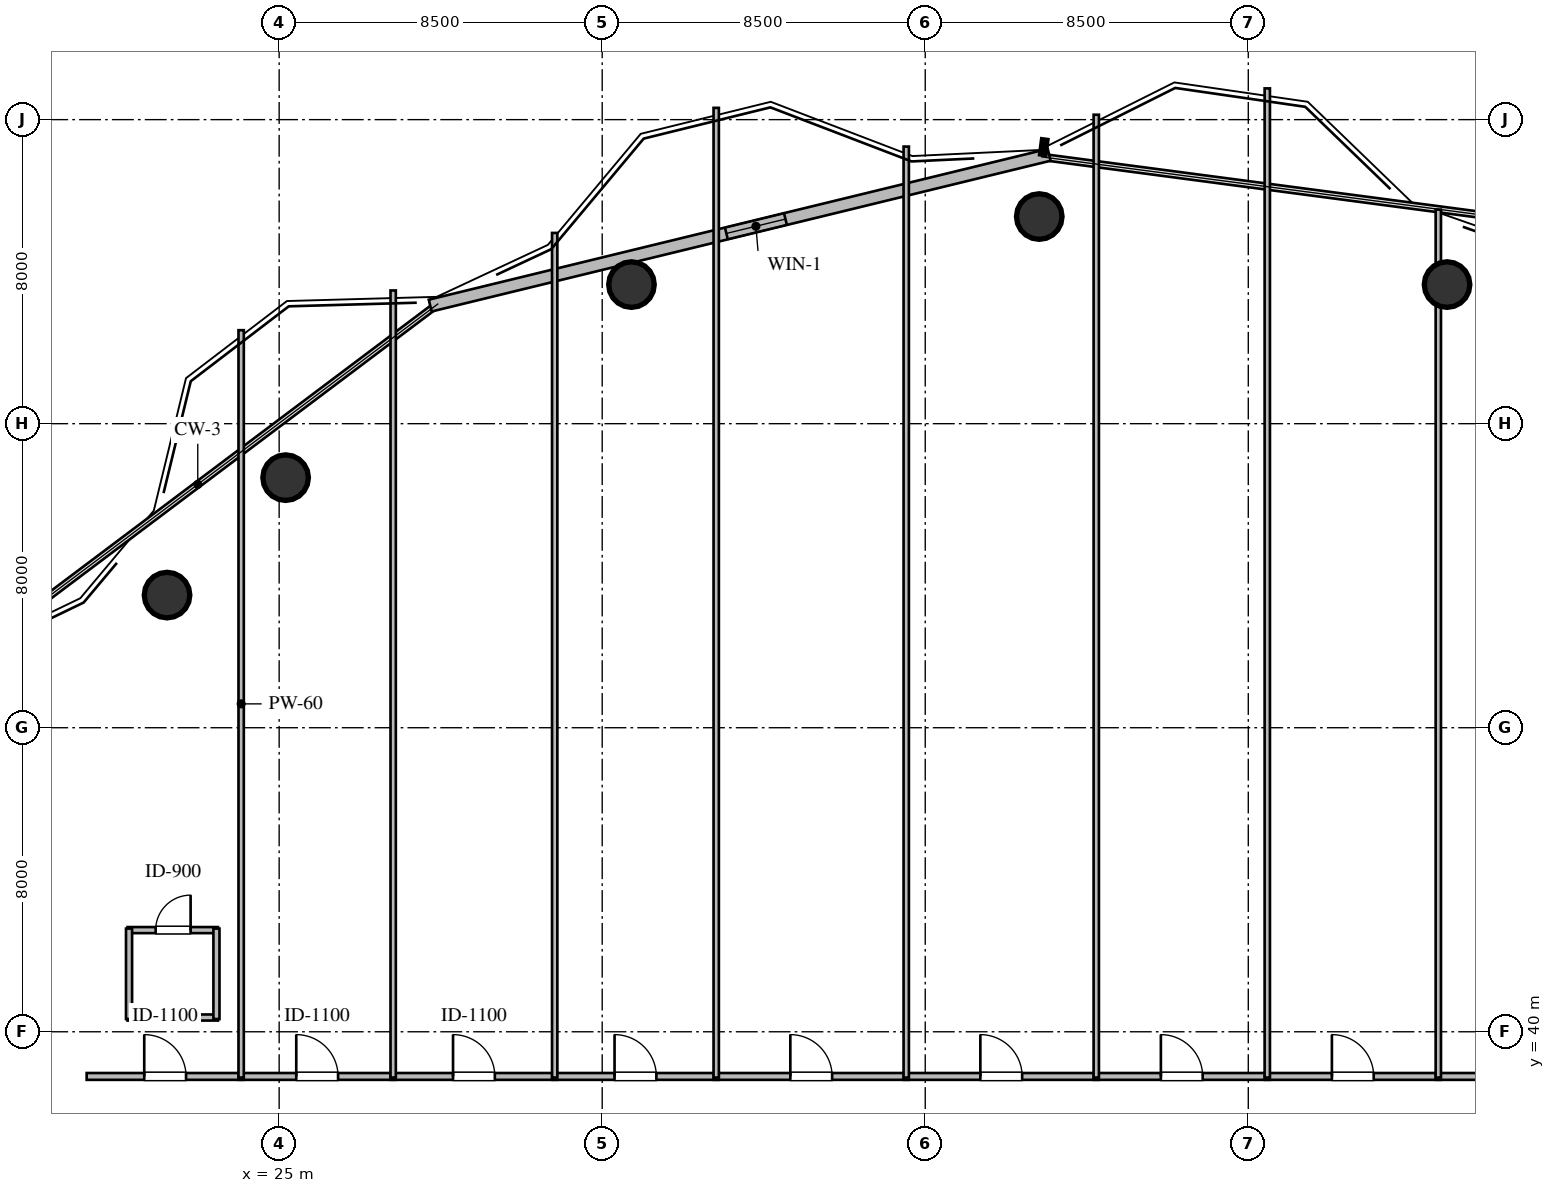
"""IFC4 building model, lengths in metres.
Left out: names, types, materials, properties, quantities, classifications, styles, units other than length and angle.
Written with IfcOpenShell. Run it as: python <this file> out.ifc"""

import sys

from ifc_helpers import new_model, si_unit, direction, frame, frame_2d, origin, origin_2d, place, context, subcontext, project, spatial, rectangle, circle, extrude, element, fill, save


model = new_model("IFC4")
c1 = context("Model", 3, precision=1e-05, world=origin(), true_north=direction((0.0, 1.0)))
c2 = subcontext(c1, "Body", "Model", "MODEL_VIEW")
j1 = project(units=[si_unit("LENGTHUNIT", "METRE"), si_unit("PLANEANGLEUNIT", "RADIAN")], contexts=[c1])
p1 = place(None, origin())
s1 = spatial("IfcSite", under=j1, at=p1, CompositionType="ELEMENT")
p2 = place(p1, origin())
s2 = spatial("IfcBuilding", under=s1, at=p2, CompositionType="ELEMENT")
p3 = place(p2, frame((0.0, 0.0, 113.4)))
s3 = spatial("IfcBuildingStorey", under=s2, at=p3, CompositionType="ELEMENT", Elevation=113.4)
for number, where, z_axis, x_axis in (
    (1, (55.73, 59.66, 0.0), (0.0, 0.0, 1.0), (1.0, 0.0, 0.0)),
    (2, (45.0, 61.45, 0.0), (0.0, 0.0, 1.0), (1.0, 0.0, 0.0)),
    (3, (34.27, 59.66, 0.0), (0.0, 0.0, 1.0), (1.0, 0.0, 0.0)),
    (4, (25.17, 54.58, 0.0), (0.0, 0.0, 1.0), (1.0, 0.0, 0.0)),
    (5, (22.05, 51.49, 0.0), (0.0, 0.0, 1.0), (1.0, 0.0, 0.0)),
):
    element("IfcColumn", number, at=place(p3, frame(where, z_axis=z_axis, x_axis=x_axis)), inside=s3, PredefinedType="COLUMN", context=c2, shape_type="SweptSolid", body=[
        extrude(circle(Radius=0.6, at=origin_2d()), origin(), (0.0, 0.0, 1.0), 3.6),
    ])
p4 = place(p3, frame((28.974, 59.107, 0.0), z_axis=(0.0, 0.0, 1.0), x_axis=(0.971593971582, 0.236654081699, 0.0)))
e6 = element("IfcWall", 6, at=p4, inside=s3, PredefinedType="STANDARD", context=c2, shape_type="SweptSolid", body=[
    extrude(rectangle(XDim=16.763, YDim=0.32, at=frame_2d((8.381, 0.0))), origin(), (0.0, 0.0, 1.0), 3.36),
])
p5 = place(p4, frame((8.021, 0.0, 1.05)))
e7 = element("IfcOpeningElement", 7, at=p5, cuts=e6, PredefinedType="OPENING", context=c2, shape_type="SweptSolid", body=[
    extrude(rectangle(XDim=1.6, YDim=1.5, at=frame_2d((0.8, 0.75))), frame((0.0, 0.17, 0.0), z_axis=(0.0, -1.0, 0.0), x_axis=(1.0, 0.0, 0.0)), (0.0, 0.0, 1.0), 0.34),
])
p6 = place(p3, frame((21.01, 40.375, 0.0), z_axis=(0.0, 0.0, 1.0), x_axis=(1.0, 0.0, 0.0)))
e8 = element("IfcWall", 8, at=p6, inside=s3, PredefinedType="PLUMBINGWALL", context=c2, shape_type="SweptSolid", body=[
    extrude(rectangle(XDim=2.38, YDim=0.16, at=frame_2d((1.19, 0.0))), origin(), (0.0, 0.0, 1.0), 3.36),
])
p7 = place(p3, frame((21.01, 42.675, 0.0), z_axis=(0.0, 0.0, 1.0), x_axis=(1.0, 0.0, 0.0)))
e9 = element("IfcWall", 9, at=p7, inside=s3, PredefinedType="PLUMBINGWALL", context=c2, shape_type="SweptSolid", body=[
    extrude(rectangle(XDim=2.38, YDim=0.16, at=frame_2d((1.19, 0.0))), origin(), (0.0, 0.0, 1.0), 3.36),
])
p8 = place(p7, frame((0.74, 0.0, 0.0)))
e10 = element("IfcOpeningElement", 10, at=p8, cuts=e9, PredefinedType="OPENING", context=c2, shape_type="SweptSolid", body=[
    extrude(rectangle(XDim=0.92, YDim=2.1, at=frame_2d((0.46, 1.05))), frame((0.0, 0.09, 0.0), z_axis=(0.0, -1.0, 0.0), x_axis=(1.0, 0.0, 0.0)), (0.0, 0.0, 1.0), 0.18),
])
p9 = place(p3, frame((21.05, 40.335, 0.0), z_axis=(0.0, 0.0, 1.0), x_axis=(0.0, 1.0, 0.0)))
e11 = element("IfcWall", 11, at=p9, inside=s3, PredefinedType="PLUMBINGWALL", context=c2, shape_type="SweptSolid", body=[
    extrude(rectangle(XDim=2.38, YDim=0.16, at=frame_2d((1.19, 0.0))), origin(), (0.0, 0.0, 1.0), 3.36),
])
p10 = place(p3, frame((23.35, 40.335, 0.0), z_axis=(0.0, 0.0, 1.0), x_axis=(0.0, 1.0, 0.0)))
e12 = element("IfcWall", 12, at=p10, inside=s3, PredefinedType="PLUMBINGWALL", context=c2, shape_type="SweptSolid", body=[
    extrude(rectangle(XDim=2.38, YDim=0.16, at=frame_2d((1.19, 0.0))), origin(), (0.0, 0.0, 1.0), 2.89),
])
p11 = place(p3, frame((19.935, 38.825, 0.0), z_axis=(0.0, 0.0, 1.0), x_axis=(1.0, 0.0, 0.0)))
e13 = element("IfcWall", 13, at=p11, inside=s3, PredefinedType="PARTITIONING", context=c2, shape_type="SweptSolid", body=[
    extrude(rectangle(XDim=4.13, YDim=0.18, at=frame_2d((2.065, 0.0))), origin(), (0.0, 0.0, 1.0), 3.36),
])
p12 = place(p11, frame((1.515, 0.0, 0.0)))
e14 = element("IfcOpeningElement", 14, at=p12, cuts=e13, PredefinedType="OPENING", context=c2, shape_type="SweptSolid", body=[
    extrude(rectangle(XDim=1.1, YDim=2.1, at=frame_2d((0.55, 1.05))), frame((0.0, 0.1, 0.0), z_axis=(0.0, -1.0, 0.0), x_axis=(1.0, 0.0, 0.0)), (0.0, 0.0, 1.0), 0.2),
])
p13 = place(p3, frame((23.935, 38.825, 0.0), z_axis=(0.0, 0.0, 1.0), x_axis=(1.0, 0.0, 0.0)))
e15 = element("IfcWall", 15, at=p13, inside=s3, PredefinedType="PARTITIONING", context=c2, shape_type="SweptSolid", body=[
    extrude(rectangle(XDim=4.13, YDim=0.18, at=frame_2d((2.065, 0.0))), origin(), (0.0, 0.0, 1.0), 3.36),
])
p14 = place(p13, frame((1.515, 0.0, 0.0)))
e16 = element("IfcOpeningElement", 16, at=p14, cuts=e15, PredefinedType="OPENING", context=c2, shape_type="SweptSolid", body=[
    extrude(rectangle(XDim=1.1, YDim=2.1, at=frame_2d((0.55, 1.05))), frame((0.0, 0.1, 0.0), z_axis=(0.0, -1.0, 0.0), x_axis=(1.0, 0.0, 0.0)), (0.0, 0.0, 1.0), 0.2),
])
p15 = place(p3, frame((27.935, 38.825, 0.0), z_axis=(0.0, 0.0, 1.0), x_axis=(1.0, 0.0, 0.0)))
e17 = element("IfcWall", 17, at=p15, inside=s3, PredefinedType="PARTITIONING", context=c2, shape_type="SweptSolid", body=[
    extrude(rectangle(XDim=4.38, YDim=0.18, at=frame_2d((2.19, 0.0))), origin(), (0.0, 0.0, 1.0), 3.36),
])
p16 = place(p15, frame((1.64, 0.0, 0.0)))
e18 = element("IfcOpeningElement", 18, at=p16, cuts=e17, PredefinedType="OPENING", context=c2, shape_type="SweptSolid", body=[
    extrude(rectangle(XDim=1.1, YDim=2.1, at=frame_2d((0.55, 1.05))), frame((0.0, 0.1, 0.0), z_axis=(0.0, -1.0, 0.0), x_axis=(1.0, 0.0, 0.0)), (0.0, 0.0, 1.0), 0.2),
])
p17 = place(p3, frame((32.185, 38.825, 0.0), z_axis=(0.0, 0.0, 1.0), x_axis=(1.0, 0.0, 0.0)))
e19 = element("IfcWall", 19, at=p17, inside=s3, PredefinedType="PARTITIONING", context=c2, shape_type="SweptSolid", body=[
    extrude(rectangle(XDim=4.38, YDim=0.18, at=frame_2d((2.19, 0.0))), origin(), (0.0, 0.0, 1.0), 3.36),
])
p18 = place(p17, frame((1.64, 0.0, 0.0)))
e20 = element("IfcOpeningElement", 20, at=p18, cuts=e19, PredefinedType="OPENING", context=c2, shape_type="SweptSolid", body=[
    extrude(rectangle(XDim=1.1, YDim=2.1, at=frame_2d((0.55, 1.05))), frame((0.0, 0.1, 0.0), z_axis=(0.0, -1.0, 0.0), x_axis=(1.0, 0.0, 0.0)), (0.0, 0.0, 1.0), 0.2),
])
p19 = place(p3, frame((36.435, 38.825, 0.0), z_axis=(0.0, 0.0, 1.0), x_axis=(1.0, 0.0, 0.0)))
e21 = element("IfcWall", 21, at=p19, inside=s3, PredefinedType="PARTITIONING", context=c2, shape_type="SweptSolid", body=[
    extrude(rectangle(XDim=5.13, YDim=0.18, at=frame_2d((2.565, 0.0))), origin(), (0.0, 0.0, 1.0), 3.36),
])
p20 = place(p19, frame((2.015, 0.0, 0.0)))
e22 = element("IfcOpeningElement", 22, at=p20, cuts=e21, PredefinedType="OPENING", context=c2, shape_type="SweptSolid", body=[
    extrude(rectangle(XDim=1.1, YDim=2.1, at=frame_2d((0.55, 1.05))), frame((0.0, 0.1, 0.0), z_axis=(0.0, -1.0, 0.0), x_axis=(1.0, 0.0, 0.0)), (0.0, 0.0, 1.0), 0.2),
])
p21 = place(p3, frame((41.435, 38.825, 0.0), z_axis=(0.0, 0.0, 1.0), x_axis=(1.0, 0.0, 0.0)))
e23 = element("IfcWall", 23, at=p21, inside=s3, PredefinedType="PARTITIONING", context=c2, shape_type="SweptSolid", body=[
    extrude(rectangle(XDim=5.13, YDim=0.18, at=frame_2d((2.565, 0.0))), origin(), (0.0, 0.0, 1.0), 3.36),
])
p22 = place(p21, frame((2.015, 0.0, 0.0)))
e24 = element("IfcOpeningElement", 24, at=p22, cuts=e23, PredefinedType="OPENING", context=c2, shape_type="SweptSolid", body=[
    extrude(rectangle(XDim=1.1, YDim=2.1, at=frame_2d((0.55, 1.05))), frame((0.0, 0.1, 0.0), z_axis=(0.0, -1.0, 0.0), x_axis=(1.0, 0.0, 0.0)), (0.0, 0.0, 1.0), 0.2),
])
p23 = place(p3, frame((46.435, 38.825, 0.0), z_axis=(0.0, 0.0, 1.0), x_axis=(1.0, 0.0, 0.0)))
e25 = element("IfcWall", 25, at=p23, inside=s3, PredefinedType="PARTITIONING", context=c2, shape_type="SweptSolid", body=[
    extrude(rectangle(XDim=4.63, YDim=0.18, at=frame_2d((2.315, 0.0))), origin(), (0.0, 0.0, 1.0), 3.36),
])
p24 = place(p23, frame((1.765, 0.0, 0.0)))
e26 = element("IfcOpeningElement", 26, at=p24, cuts=e25, PredefinedType="OPENING", context=c2, shape_type="SweptSolid", body=[
    extrude(rectangle(XDim=1.1, YDim=2.1, at=frame_2d((0.55, 1.05))), frame((0.0, 0.1, 0.0), z_axis=(0.0, -1.0, 0.0), x_axis=(1.0, 0.0, 0.0)), (0.0, 0.0, 1.0), 0.2),
])
p25 = place(p3, frame((50.935, 38.825, 0.0), z_axis=(0.0, 0.0, 1.0), x_axis=(1.0, 0.0, 0.0)))
e27 = element("IfcWall", 27, at=p25, inside=s3, PredefinedType="PARTITIONING", context=c2, shape_type="SweptSolid", body=[
    extrude(rectangle(XDim=4.63, YDim=0.18, at=frame_2d((2.315, 0.0))), origin(), (0.0, 0.0, 1.0), 3.36),
])
p26 = place(p25, frame((1.765, 0.0, 0.0)))
e28 = element("IfcOpeningElement", 28, at=p26, cuts=e27, PredefinedType="OPENING", context=c2, shape_type="SweptSolid", body=[
    extrude(rectangle(XDim=1.1, YDim=2.1, at=frame_2d((0.55, 1.05))), frame((0.0, 0.1, 0.0), z_axis=(0.0, -1.0, 0.0), x_axis=(1.0, 0.0, 0.0)), (0.0, 0.0, 1.0), 0.2),
])
p27 = place(p3, frame((55.435, 38.825, 0.0), z_axis=(0.0, 0.0, 1.0), x_axis=(1.0, 0.0, 0.0)))
e29 = element("IfcWall", 29, at=p27, inside=s3, PredefinedType="PARTITIONING", context=c2, shape_type="SweptSolid", body=[
    extrude(rectangle(XDim=9.66, YDim=0.18, at=frame_2d((4.83, 0.0))), origin(), (0.0, 0.0, 1.0), 3.36),
])
p28 = place(p27, frame((4.28, 0.0, 0.0)))
e30 = element("IfcOpeningElement", 30, at=p28, cuts=e29, PredefinedType="OPENING", context=c2, shape_type="SweptSolid", body=[
    extrude(rectangle(XDim=1.1, YDim=2.1, at=frame_2d((0.55, 1.05))), frame((0.0, 0.1, 0.0), z_axis=(0.0, -1.0, 0.0), x_axis=(1.0, 0.0, 0.0)), (0.0, 0.0, 1.0), 0.2),
])
p29 = place(p3, frame((24.0, 58.46, 0.0), z_axis=(0.0, 0.0, 1.0), x_axis=(0.0, -1.0, 0.0)))
e31 = element("IfcWall", 31, at=p29, inside=s3, PredefinedType="PARTITIONING", context=c2, shape_type="SweptSolid", body=[
    extrude(rectangle(XDim=19.665, YDim=0.14, at=frame_2d((9.833, 0.0))), origin(), (0.0, 0.0, 1.0), 2.89),
])
p30 = place(p3, frame((28.0, 59.505, 0.0), z_axis=(0.0, 0.0, 1.0), x_axis=(0.0, -1.0, 0.0)))
e32 = element("IfcWall", 32, at=p30, inside=s3, PredefinedType="PARTITIONING", context=c2, shape_type="SweptSolid", body=[
    extrude(rectangle(XDim=20.71, YDim=0.14, at=frame_2d((10.355, 0.0))), origin(), (0.0, 0.0, 1.0), 3.36),
])
p31 = place(p3, frame((32.25, 61.019, 0.0), z_axis=(0.0, 0.0, 1.0), x_axis=(0.0, -1.0, 0.0)))
e33 = element("IfcWall", 33, at=p31, inside=s3, PredefinedType="PARTITIONING", context=c2, shape_type="SweptSolid", body=[
    extrude(rectangle(XDim=22.224, YDim=0.14, at=frame_2d((11.112, 0.0))), origin(), (0.0, 0.0, 1.0), 3.36),
])
p32 = place(p3, frame((36.5, 64.31, 0.0), z_axis=(0.0, 0.0, 1.0), x_axis=(0.0, -1.0, 0.0)))
e34 = element("IfcWall", 34, at=p32, inside=s3, PredefinedType="PARTITIONING", context=c2, shape_type="SweptSolid", body=[
    extrude(rectangle(XDim=25.515, YDim=0.14, at=frame_2d((12.758, 0.0))), origin(), (0.0, 0.0, 1.0), 3.36),
])
p33 = place(p3, frame((41.5, 63.291, 0.0), z_axis=(0.0, 0.0, 1.0), x_axis=(0.0, -1.0, 0.0)))
e35 = element("IfcWall", 35, at=p33, inside=s3, PredefinedType="PARTITIONING", context=c2, shape_type="SweptSolid", body=[
    extrude(rectangle(XDim=24.496, YDim=0.14, at=frame_2d((12.248, 0.0))), origin(), (0.0, 0.0, 1.0), 3.36),
])
p34 = place(p3, frame((46.5, 64.129, 0.0), z_axis=(0.0, 0.0, 1.0), x_axis=(0.0, -1.0, 0.0)))
e36 = element("IfcWall", 36, at=p34, inside=s3, PredefinedType="PARTITIONING", context=c2, shape_type="SweptSolid", body=[
    extrude(rectangle(XDim=25.334, YDim=0.14, at=frame_2d((12.667, 0.0))), origin(), (0.0, 0.0, 1.0), 3.36),
])
p35 = place(p3, frame((51.0, 64.822, 0.0), z_axis=(0.0, 0.0, 1.0), x_axis=(0.0, -1.0, 0.0)))
e37 = element("IfcWall", 37, at=p35, inside=s3, PredefinedType="PARTITIONING", context=c2, shape_type="SweptSolid", body=[
    extrude(rectangle(XDim=26.027, YDim=0.14, at=frame_2d((13.014, 0.0))), origin(), (0.0, 0.0, 1.0), 3.36),
])
p36 = place(p3, frame((55.5, 61.633, 0.0), z_axis=(0.0, 0.0, 1.0), x_axis=(0.0, -1.0, 0.0)))
e38 = element("IfcWall", 38, at=p36, inside=s3, PredefinedType="PARTITIONING", context=c2, shape_type="SweptSolid", body=[
    extrude(rectangle(XDim=22.838, YDim=0.14, at=frame_2d((11.419, 0.0))), origin(), (0.0, 0.0, 1.0), 3.36),
])
p37 = place(p5, origin())
e39 = element("IfcWindow", 39, at=p37, inside=s3, PartitioningType="SINGLE_PANEL", PredefinedType="WINDOW", context=c2, shape_type="SweptSolid", body=[
    extrude(rectangle(XDim=1.6, YDim=1.5, at=frame_2d((0.8, 0.75))), frame((0.0, 0.03, 0.0), z_axis=(0.0, -1.0, 0.0), x_axis=(1.0, 0.0, 0.0)), (0.0, 0.0, 1.0), 0.06),
])
fill(e7, e39)
p38 = place(p8, origin())
e40 = element("IfcDoor", 40, at=p38, inside=s3, OperationType="SINGLE_SWING_RIGHT", PredefinedType="DOOR", context=c2, shape_type="SweptSolid", body=[
    extrude(rectangle(XDim=0.92, YDim=2.1, at=frame_2d((0.46, 1.05))), frame((0.0, 0.025, 0.0), z_axis=(0.0, -1.0, 0.0), x_axis=(1.0, 0.0, 0.0)), (0.0, 0.0, 1.0), 0.05),
])
fill(e10, e40)
p39 = place(p12, origin())
e41 = element("IfcDoor", 41, at=p39, inside=s3, OperationType="SINGLE_SWING_LEFT", PredefinedType="DOOR", context=c2, shape_type="SweptSolid", body=[
    extrude(rectangle(XDim=1.1, YDim=2.1, at=frame_2d((0.55, 1.05))), frame((0.0, 0.025, 0.0), z_axis=(0.0, -1.0, 0.0), x_axis=(1.0, 0.0, 0.0)), (0.0, 0.0, 1.0), 0.05),
])
fill(e14, e41)
p40 = place(p14, origin())
e42 = element("IfcDoor", 42, at=p40, inside=s3, OperationType="SINGLE_SWING_LEFT", PredefinedType="DOOR", context=c2, shape_type="SweptSolid", body=[
    extrude(rectangle(XDim=1.1, YDim=2.1, at=frame_2d((0.55, 1.05))), frame((0.0, 0.025, 0.0), z_axis=(0.0, -1.0, 0.0), x_axis=(1.0, 0.0, 0.0)), (0.0, 0.0, 1.0), 0.05),
])
fill(e16, e42)
p41 = place(p16, origin())
e43 = element("IfcDoor", 43, at=p41, inside=s3, OperationType="SINGLE_SWING_LEFT", PredefinedType="DOOR", context=c2, shape_type="SweptSolid", body=[
    extrude(rectangle(XDim=1.1, YDim=2.1, at=frame_2d((0.55, 1.05))), frame((0.0, 0.025, 0.0), z_axis=(0.0, -1.0, 0.0), x_axis=(1.0, 0.0, 0.0)), (0.0, 0.0, 1.0), 0.05),
])
fill(e18, e43)
p42 = place(p18, origin())
e44 = element("IfcDoor", 44, at=p42, inside=s3, OperationType="SINGLE_SWING_LEFT", PredefinedType="DOOR", context=c2, shape_type="SweptSolid", body=[
    extrude(rectangle(XDim=1.1, YDim=2.1, at=frame_2d((0.55, 1.05))), frame((0.0, 0.025, 0.0), z_axis=(0.0, -1.0, 0.0), x_axis=(1.0, 0.0, 0.0)), (0.0, 0.0, 1.0), 0.05),
])
fill(e20, e44)
p43 = place(p20, origin())
e45 = element("IfcDoor", 45, at=p43, inside=s3, OperationType="SINGLE_SWING_LEFT", PredefinedType="DOOR", context=c2, shape_type="SweptSolid", body=[
    extrude(rectangle(XDim=1.1, YDim=2.1, at=frame_2d((0.55, 1.05))), frame((0.0, 0.025, 0.0), z_axis=(0.0, -1.0, 0.0), x_axis=(1.0, 0.0, 0.0)), (0.0, 0.0, 1.0), 0.05),
])
fill(e22, e45)
p44 = place(p22, origin())
e46 = element("IfcDoor", 46, at=p44, inside=s3, OperationType="SINGLE_SWING_LEFT", PredefinedType="DOOR", context=c2, shape_type="SweptSolid", body=[
    extrude(rectangle(XDim=1.1, YDim=2.1, at=frame_2d((0.55, 1.05))), frame((0.0, 0.025, 0.0), z_axis=(0.0, -1.0, 0.0), x_axis=(1.0, 0.0, 0.0)), (0.0, 0.0, 1.0), 0.05),
])
fill(e24, e46)
p45 = place(p24, origin())
e47 = element("IfcDoor", 47, at=p45, inside=s3, OperationType="SINGLE_SWING_LEFT", PredefinedType="DOOR", context=c2, shape_type="SweptSolid", body=[
    extrude(rectangle(XDim=1.1, YDim=2.1, at=frame_2d((0.55, 1.05))), frame((0.0, 0.025, 0.0), z_axis=(0.0, -1.0, 0.0), x_axis=(1.0, 0.0, 0.0)), (0.0, 0.0, 1.0), 0.05),
])
fill(e26, e47)
p46 = place(p26, origin())
e48 = element("IfcDoor", 48, at=p46, inside=s3, OperationType="SINGLE_SWING_LEFT", PredefinedType="DOOR", context=c2, shape_type="SweptSolid", body=[
    extrude(rectangle(XDim=1.1, YDim=2.1, at=frame_2d((0.55, 1.05))), frame((0.0, 0.025, 0.0), z_axis=(0.0, -1.0, 0.0), x_axis=(1.0, 0.0, 0.0)), (0.0, 0.0, 1.0), 0.05),
])
fill(e28, e48)
save(model, sys.argv[1])
